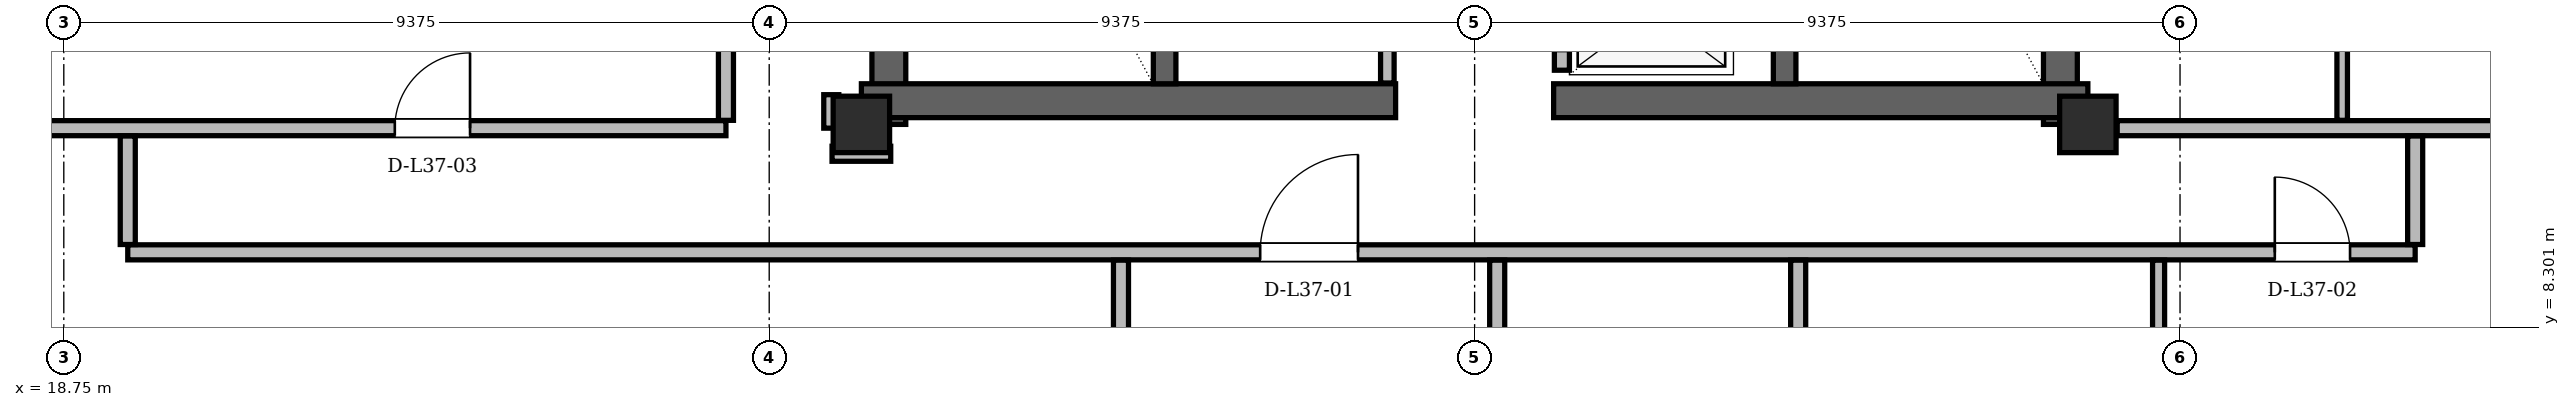
"""IFC4 building model, lengths in metres.
Left out: names, types, materials, properties, quantities, classifications, styles, units other than length and angle.
Written with IfcOpenShell. Run it as: python <this file> out.ifc"""

import sys

from ifc_helpers import new_model, si_unit, direction, frame, frame_2d, origin, origin_2d, place, context, subcontext, project, spatial, rectangle, hollow_rectangle, extrude, element, fill, save


model = new_model("IFC4")
c1 = context("Model", 3, precision=1e-05, world=origin(), true_north=direction((0.0, 1.0)))
c2 = subcontext(c1, "Body", "Model", "MODEL_VIEW")
j1 = project(units=[si_unit("LENGTHUNIT", "METRE"), si_unit("PLANEANGLEUNIT", "RADIAN")], contexts=[c1])
p1 = place(None, origin())
s1 = spatial("IfcSite", under=j1, at=p1, CompositionType="ELEMENT")
p2 = place(p1, origin())
s2 = spatial("IfcBuilding", under=s1, at=p2, CompositionType="ELEMENT")
p3 = place(p2, frame((0.0, 0.0, 142.2)))
s3 = spatial("IfcBuildingStorey", under=s2, at=p3, CompositionType="ELEMENT", Elevation=142.2)
for number, where, z_axis, x_axis in (
    (1, (29.35, 11.0, 0.0), (0.0, 0.0, 1.0), (1.0, 0.0, 0.0)),
    (2, (45.65, 11.0, 0.0), (0.0, 0.0, 1.0), (1.0, 0.0, 0.0)),
):
    element("IfcColumn", number, at=place(p3, frame(where, z_axis=z_axis, x_axis=x_axis)), inside=s3, PredefinedType="COLUMN", context=c2, shape_type="SweptSolid", body=[
        extrude(hollow_rectangle(XDim=0.75, YDim=0.75, WallThickness=0.06, at=origin_2d()), origin(), (0.0, 0.0, 1.0), 3.6),
    ])
for number, where, z_axis, x_axis in (
    (3, (29.715, 11.0, 0.0), (0.0, 0.0, 1.0), (0.0, 1.0, 0.0)),
    (4, (45.285, 11.0, 0.0), (0.0, 0.0, 1.0), (0.0, 1.0, 0.0)),
):
    element("IfcWall", number, at=place(p3, frame(where, z_axis=z_axis, x_axis=x_axis)), inside=s3, PredefinedType="SHEAR", context=c2, shape_type="SweptSolid", body=[
        extrude(rectangle(XDim=13.3, YDim=0.45, at=frame_2d((6.65, 0.0))), origin(), (0.0, 0.0, 1.0), 3.36),
    ])
for number, where, z_axis, x_axis in (
    (5, (29.35, 11.315, 0.0), (0.0, 0.0, 1.0), (1.0, 0.0, 0.0)),
    (6, (38.55, 11.315, 0.0), (0.0, 0.0, 1.0), (1.0, 0.0, 0.0)),
):
    element("IfcWall", number, at=place(p3, frame(where, z_axis=z_axis, x_axis=x_axis)), inside=s3, PredefinedType="SHEAR", context=c2, shape_type="SweptSolid", body=[
        extrude(rectangle(XDim=7.1, YDim=0.45, at=frame_2d((3.55, 0.0))), origin(), (0.0, 0.0, 1.0), 3.36),
    ])
for number, where, z_axis, x_axis in (
    (7, (33.38, 11.54, 0.0), (0.0, 0.0, 1.0), (0.0, 1.0, 0.0)),
    (8, (41.62, 11.54, 0.0), (0.0, 0.0, 1.0), (0.0, 1.0, 0.0)),
):
    element("IfcWall", number, at=place(p3, frame(where, z_axis=z_axis, x_axis=x_axis)), inside=s3, PredefinedType="SHEAR", context=c2, shape_type="SweptSolid", body=[
        extrude(rectangle(XDim=7.62, YDim=0.3, at=frame_2d((3.81, 0.0))), origin(), (0.0, 0.0, 1.0), 3.36),
    ])
p4 = place(p3, frame((14.897, 12.75, 0.0), z_axis=(0.0, 0.0, 1.0), x_axis=(0.500014298586, -0.866017148335, 0.0)))
e9 = element("IfcWall", 9, at=p4, inside=s3, PredefinedType="SOLIDWALL", context=c2, shape_type="SweptSolid", body=[
    extrude(rectangle(XDim=9.872, YDim=0.34, at=frame_2d((4.936, 0.0))), origin(), (0.0, 0.0, 1.0), 2.58),
])
p5 = place(p3, frame((36.34, 11.55, 0.0), z_axis=(0.0, 0.0, 1.0), x_axis=(0.0, 1.0, 0.0)))
e10 = element("IfcWall", 10, at=p5, inside=s3, PredefinedType="PARTITIONING", context=c2, shape_type="SweptSolid", body=[
    extrude(rectangle(XDim=5.55, YDim=0.18, at=frame_2d((2.775, 0.0))), origin(), (0.0, 0.0, 1.0), 3.36),
])
p6 = place(p5, frame((0.55, 0.0, 0.0)))
e11 = element("IfcOpeningElement", 11, at=p6, cuts=e10, PredefinedType="OPENING", context=c2, shape_type="SweptSolid", body=[
    extrude(rectangle(XDim=0.88, YDim=2.08, at=frame_2d((0.44, 1.04))), frame((0.0, 0.09, 0.0), z_axis=(0.0, -1.0, 0.0), x_axis=(1.0, 0.0, 0.0)), (0.0, 0.0, 1.0), 0.18),
])
p7 = place(p5, frame((3.25, 0.0, 0.0)))
e12 = element("IfcOpeningElement", 12, at=p7, cuts=e10, PredefinedType="OPENING", context=c2, shape_type="SweptSolid", body=[
    extrude(rectangle(XDim=0.88, YDim=2.08, at=frame_2d((0.44, 1.04))), frame((0.0, 0.09, 0.0), z_axis=(0.0, -1.0, 0.0), x_axis=(1.0, 0.0, 0.0)), (0.0, 0.0, 1.0), 0.18),
])
p8 = place(p3, frame((38.66, 11.72, 0.0), z_axis=(0.0, 0.0, 1.0), x_axis=(0.0, 1.0, 0.0)))
e13 = element("IfcWall", 13, at=p8, inside=s3, PredefinedType="PARTITIONING", context=c2, shape_type="SweptSolid", body=[
    extrude(rectangle(XDim=9.1, YDim=0.2, at=frame_2d((4.55, 0.0))), origin(), (0.0, 0.0, 1.0), 3.36),
])
p9 = place(p8, frame((0.255, 0.0, 0.0)))
e14 = element("IfcOpeningElement", 14, at=p9, cuts=e13, PredefinedType="OPENING", context=c2, shape_type="SweptSolid", body=[
    extrude(rectangle(XDim=1.05, YDim=2.15, at=frame_2d((0.525, 1.075))), frame((0.0, 0.1, 0.0), z_axis=(0.0, -1.0, 0.0), x_axis=(1.0, 0.0, 0.0)), (0.0, 0.0, 1.0), 0.2),
])
p10 = place(p8, frame((2.105, 0.0, 0.0)))
e15 = element("IfcOpeningElement", 15, at=p10, cuts=e13, PredefinedType="OPENING", context=c2, shape_type="SweptSolid", body=[
    extrude(rectangle(XDim=1.05, YDim=2.15, at=frame_2d((0.525, 1.075))), frame((0.0, 0.1, 0.0), z_axis=(0.0, -1.0, 0.0), x_axis=(1.0, 0.0, 0.0)), (0.0, 0.0, 1.0), 0.2),
])
p11 = place(p8, frame((3.955, 0.0, 0.0)))
e16 = element("IfcOpeningElement", 16, at=p11, cuts=e13, PredefinedType="OPENING", context=c2, shape_type="SweptSolid", body=[
    extrude(rectangle(XDim=1.05, YDim=2.15, at=frame_2d((0.525, 1.075))), frame((0.0, 0.1, 0.0), z_axis=(0.0, -1.0, 0.0), x_axis=(1.0, 0.0, 0.0)), (0.0, 0.0, 1.0), 0.2),
])
p12 = place(p3, frame((19.6, 9.3, 0.0), z_axis=(0.0, 0.0, 1.0), x_axis=(1.0, 0.0, 0.0)))
e17 = element("IfcWall", 17, at=p12, inside=s3, PredefinedType="PARTITIONING", context=c2, shape_type="SweptSolid", body=[
    extrude(rectangle(XDim=30.4, YDim=0.2, at=frame_2d((15.2, 0.0))), origin(), (0.0, 0.0, 1.0), 2.822),
])
p13 = place(p12, frame((15.05, 0.0, 0.0)))
e18 = element("IfcOpeningElement", 18, at=p13, cuts=e17, PredefinedType="OPENING", context=c2, shape_type="SweptSolid", body=[
    extrude(rectangle(XDim=1.3, YDim=2.2, at=frame_2d((0.65, 1.1))), frame((0.0, 0.1, 0.0), z_axis=(0.0, -1.0, 0.0), x_axis=(1.0, 0.0, 0.0)), (0.0, 0.0, 1.0), 0.2),
])
p14 = place(p12, frame((28.534, 0.0, 0.0)))
e19 = element("IfcOpeningElement", 19, at=p14, cuts=e17, PredefinedType="OPENING", context=c2, shape_type="SweptSolid", body=[
    extrude(rectangle(XDim=1.0, YDim=2.18, at=frame_2d((0.5, 1.09))), frame((0.0, 0.1, 0.0), z_axis=(0.0, -1.0, 0.0), x_axis=(1.0, 0.0, 0.0)), (0.0, 0.0, 1.0), 0.2),
])
p15 = place(p3, frame((28.96, 10.61, 0.0), z_axis=(0.0, 0.0, 1.0), x_axis=(1.0, 0.0, 0.0)))
e20 = element("IfcWall", 20, at=p15, inside=s3, PredefinedType="PARTITIONING", context=c2, shape_type="SweptSolid", body=[
    extrude(rectangle(XDim=0.78, YDim=0.2, at=frame_2d((0.39, 0.0))), origin(), (0.0, 0.0, 1.0), 2.4),
])
p16 = place(p3, frame((16.137, 10.95, 0.0), z_axis=(0.0, 0.0, 1.0), x_axis=(1.0, 0.0, 0.0)))
e21 = element("IfcWall", 21, at=p16, inside=s3, PredefinedType="PARTITIONING", context=c2, shape_type="SweptSolid", body=[
    extrude(rectangle(XDim=11.413, YDim=0.2, at=frame_2d((5.707, 0.0))), origin(), (0.0, 0.0, 1.0), 3.36),
])
p17 = place(p16, frame((7.012, 0.0, 0.0)))
e22 = element("IfcOpeningElement", 22, at=p17, cuts=e21, PredefinedType="OPENING", context=c2, shape_type="SweptSolid", body=[
    extrude(rectangle(XDim=1.0, YDim=2.18, at=frame_2d((0.5, 1.09))), frame((0.0, 0.1, 0.0), z_axis=(0.0, -1.0, 0.0), x_axis=(1.0, 0.0, 0.0)), (0.0, 0.0, 1.0), 0.2),
])
p18 = place(p3, frame((46.04, 10.95, 0.0), z_axis=(0.0, 0.0, 1.0), x_axis=(1.0, 0.0, 0.0)))
e23 = element("IfcWall", 23, at=p18, inside=s3, PredefinedType="PARTITIONING", context=c2, shape_type="SweptSolid", body=[
    extrude(rectangle(XDim=12.823, YDim=0.2, at=frame_2d((6.412, 0.0))), origin(), (0.0, 0.0, 1.0), 2.822),
])
p19 = place(p3, frame((19.6, 9.404, 0.0), z_axis=(0.0, 0.0, 1.0), x_axis=(0.0, 1.0, 0.0)))
e24 = element("IfcWall", 24, at=p19, inside=s3, PredefinedType="PARTITIONING", context=c2, shape_type="SweptSolid", body=[
    extrude(rectangle(XDim=1.442, YDim=0.2, at=frame_2d((0.721, 0.0))), origin(), (0.0, 0.0, 1.0), 3.36),
])
p20 = place(p3, frame((27.55, 11.054, 0.0), z_axis=(0.0, 0.0, 1.0), x_axis=(0.0, 1.0, 0.0)))
e25 = element("IfcWall", 25, at=p20, inside=s3, PredefinedType="PARTITIONING", context=c2, shape_type="SweptSolid", body=[
    extrude(rectangle(XDim=5.692, YDim=0.2, at=frame_2d((2.846, 0.0))), origin(), (0.0, 0.0, 1.0), 2.822),
])
p21 = place(p3, frame((28.95, 10.95, 0.0), z_axis=(0.0, 0.0, 1.0), x_axis=(0.0, 1.0, 0.0)))
e26 = element("IfcWall", 26, at=p21, inside=s3, PredefinedType="PARTITIONING", context=c2, shape_type="SweptSolid", body=[
    extrude(rectangle(XDim=0.445, YDim=0.2, at=frame_2d((0.223, 0.0))), origin(), (0.0, 0.0, 1.0), 2.822),
])
p22 = place(p3, frame((32.8, 5.104, 0.0), z_axis=(0.0, 0.0, 1.0), x_axis=(0.0, 1.0, 0.0)))
e27 = element("IfcWall", 27, at=p22, inside=s3, PredefinedType="PARTITIONING", context=c2, shape_type="SweptSolid", body=[
    extrude(rectangle(XDim=4.092, YDim=0.2, at=frame_2d((2.046, 0.0))), origin(), (0.0, 0.0, 1.0), 2.946),
])
p23 = place(p3, frame((37.8, 5.104, 0.0), z_axis=(0.0, 0.0, 1.0), x_axis=(0.0, 1.0, 0.0)))
e28 = element("IfcWall", 28, at=p23, inside=s3, PredefinedType="PARTITIONING", context=c2, shape_type="SweptSolid", body=[
    extrude(rectangle(XDim=4.092, YDim=0.2, at=frame_2d((2.046, 0.0))), origin(), (0.0, 0.0, 1.0), 3.36),
])
p24 = place(p3, frame((41.8, 4.374, 0.0), z_axis=(0.0, 0.0, 1.0), x_axis=(0.0, 1.0, 0.0)))
e29 = element("IfcWall", 29, at=p24, inside=s3, PredefinedType="PARTITIONING", context=c2, shape_type="SweptSolid", body=[
    extrude(rectangle(XDim=4.822, YDim=0.2, at=frame_2d((2.411, 0.0))), origin(), (0.0, 0.0, 1.0), 2.946),
])
p25 = place(p3, frame((46.59, 4.374, 0.0), z_axis=(0.0, 0.0, 1.0), x_axis=(0.0, 1.0, 0.0)))
e30 = element("IfcWall", 30, at=p25, inside=s3, PredefinedType="PARTITIONING", context=c2, shape_type="SweptSolid", body=[
    extrude(rectangle(XDim=4.822, YDim=0.16, at=frame_2d((2.411, 0.0))), origin(), (0.0, 0.0, 1.0), 2.946),
])
p26 = place(p25, frame((2.011, 0.0, 0.0)))
e31 = element("IfcOpeningElement", 31, at=p26, cuts=e30, PredefinedType="OPENING", context=c2, shape_type="SweptSolid", body=[
    extrude(rectangle(XDim=0.88, YDim=2.08, at=frame_2d((0.44, 1.04))), frame((0.0, 0.08, 0.0), z_axis=(0.0, -1.0, 0.0), x_axis=(1.0, 0.0, 0.0)), (0.0, 0.0, 1.0), 0.16),
])
p27 = place(p3, frame((49.03, 11.054, 0.0), z_axis=(0.0, 0.0, 1.0), x_axis=(0.0, 1.0, 0.0)))
e32 = element("IfcWall", 32, at=p27, inside=s3, PredefinedType="PARTITIONING", context=c2, shape_type="SweptSolid", body=[
    extrude(rectangle(XDim=3.352, YDim=0.14, at=frame_2d((1.676, 0.0))), origin(), (0.0, 0.0, 1.0), 2.822),
])
p28 = place(p3, frame((50.0, 9.404, 0.0), z_axis=(0.0, 0.0, 1.0), x_axis=(0.0, 1.0, 0.0)))
e33 = element("IfcWall", 33, at=p28, inside=s3, PredefinedType="PARTITIONING", context=c2, shape_type="SweptSolid", body=[
    extrude(rectangle(XDim=1.442, YDim=0.2, at=frame_2d((0.721, 0.0))), origin(), (0.0, 0.0, 1.0), 3.36),
])
p29 = place(p13, origin())
e34 = element("IfcDoor", 34, at=p29, inside=s3, OperationType="SINGLE_SWING_RIGHT", PredefinedType="DOOR", context=c2, shape_type="SweptSolid", body=[
    extrude(rectangle(XDim=1.3, YDim=2.2, at=frame_2d((0.65, 1.1))), frame((0.0, 0.025, 0.0), z_axis=(0.0, -1.0, 0.0), x_axis=(1.0, 0.0, 0.0)), (0.0, 0.0, 1.0), 0.05),
])
fill(e18, e34)
p30 = place(p14, origin())
e35 = element("IfcDoor", 35, at=p30, inside=s3, OperationType="SINGLE_SWING_LEFT", PredefinedType="DOOR", context=c2, shape_type="SweptSolid", body=[
    extrude(rectangle(XDim=1.0, YDim=2.18, at=frame_2d((0.5, 1.09))), frame((0.0, 0.025, 0.0), z_axis=(0.0, -1.0, 0.0), x_axis=(1.0, 0.0, 0.0)), (0.0, 0.0, 1.0), 0.05),
])
fill(e19, e35)
p31 = place(p17, origin())
e36 = element("IfcDoor", 36, at=p31, inside=s3, OperationType="SINGLE_SWING_RIGHT", PredefinedType="DOOR", context=c2, shape_type="SweptSolid", body=[
    extrude(rectangle(XDim=1.0, YDim=2.18, at=frame_2d((0.5, 1.09))), frame((0.0, 0.025, 0.0), z_axis=(0.0, -1.0, 0.0), x_axis=(1.0, 0.0, 0.0)), (0.0, 0.0, 1.0), 0.05),
])
fill(e22, e36)
save(model, sys.argv[1])
